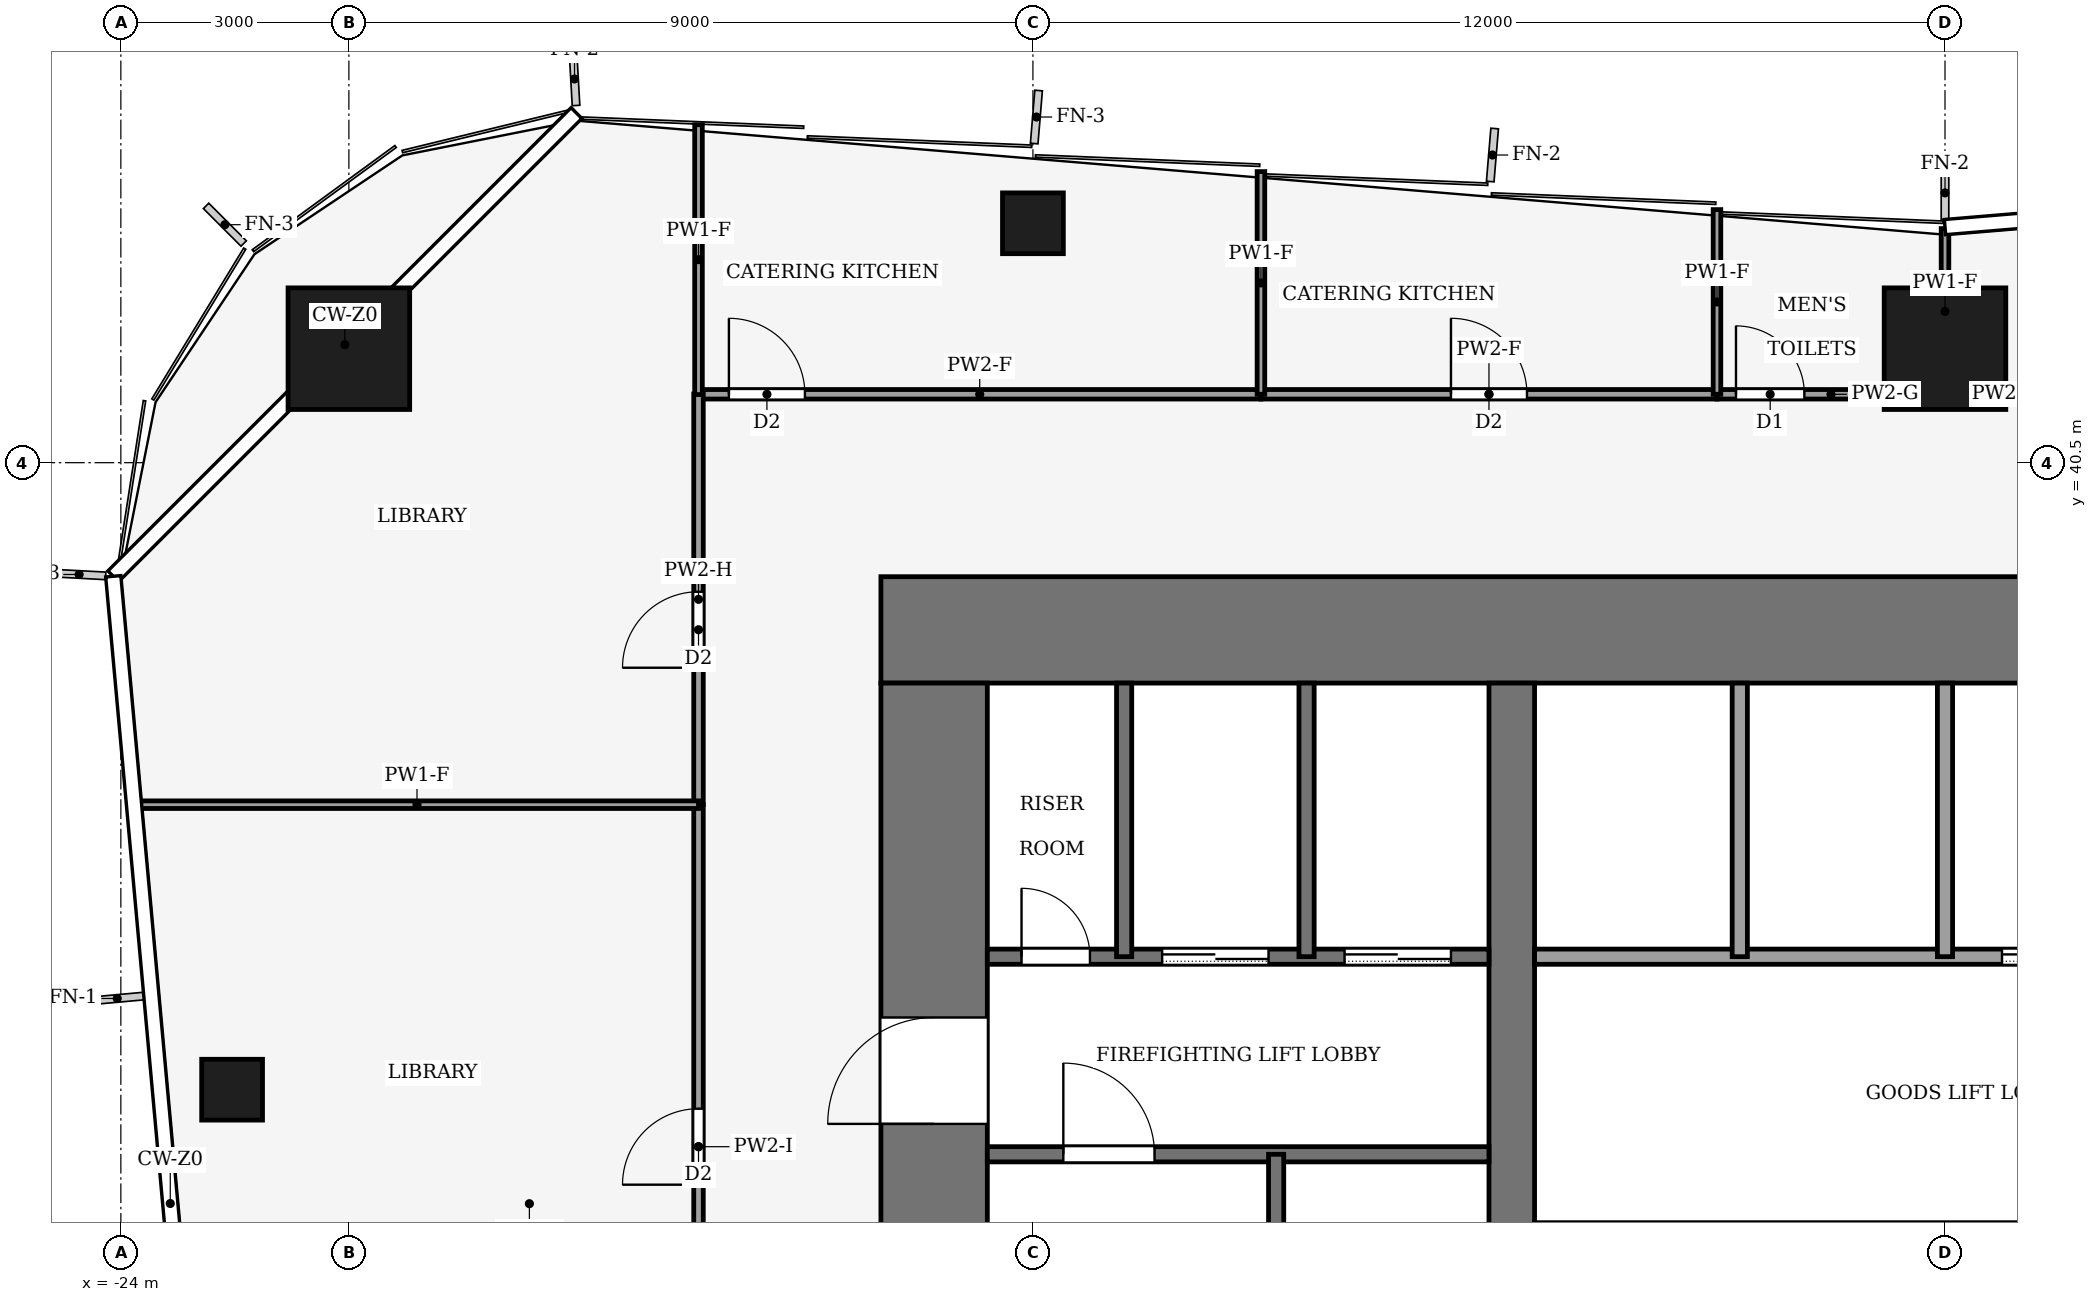
"""IFC4 building model, lengths in metres.
Left out: names, types, materials, properties, quantities, classifications, styles, units other than length and angle.
Written with IfcOpenShell. Run it as: python <this file> out.ifc"""

import sys

from ifc_helpers import new_model, si_unit, direction, frame, frame_2d, origin, origin_2d, place, context, subcontext, project, spatial, rectangle, hollow_rectangle, extrude, element, fill, save


model = new_model("IFC4")
c1 = context("Model", 3, precision=1e-05, world=origin(), true_north=direction((0.0, 1.0)))
c2 = subcontext(c1, "Body", "Model", "MODEL_VIEW")
j1 = project(units=[si_unit("LENGTHUNIT", "METRE"), si_unit("PLANEANGLEUNIT", "RADIAN")], contexts=[c1])
p1 = place(None, origin())
s1 = spatial("IfcSite", under=j1, at=p1, CompositionType="ELEMENT")
p2 = place(p1, origin())
s2 = spatial("IfcBuilding", under=s1, at=p2, CompositionType="ELEMENT")
p3 = place(p2, frame((0.0, 0.0, 14.0)))
s3 = spatial("IfcBuildingStorey", under=s2, at=p3, CompositionType="ELEMENT", Elevation=14.0)
p4 = place(p3, frame((-14.0, 38.3, -0.13), z_axis=(0.0, 0.0, 1.0), x_axis=(1.0, 0.0, 0.0)))
e1 = element("IfcWall", 1, at=p4, inside=s3, PredefinedType="SHEAR", context=c2, shape_type="SweptSolid", body=[
    extrude(rectangle(XDim=28.0, YDim=1.4, at=frame_2d((14.0, 0.0))), origin(), (0.0, 0.0, 1.0), 4.0),
])
p5 = place(p3, frame((-13.3, 18.4, -0.13), z_axis=(0.0, 0.0, 1.0), x_axis=(0.0, 1.0, 0.0)))
e2 = element("IfcWall", 2, at=p5, inside=s3, PredefinedType="SHEAR", context=c2, shape_type="SweptSolid", body=[
    extrude(rectangle(XDim=19.2, YDim=1.4, at=frame_2d((9.6, 0.0))), origin(), (0.0, 0.0, 1.0), 4.0),
])
p6 = place(p5, frame((2.8, 0.0, 0.13)))
e3 = element("IfcOpeningElement", 3, at=p6, cuts=e2, PredefinedType="OPENING", context=c2, shape_type="SweptSolid", body=[
    extrude(rectangle(XDim=2.4, YDim=2.4, at=frame_2d((1.2, 1.2))), frame((0.0, 0.71, 0.0), z_axis=(0.0, -1.0, 0.0), x_axis=(1.0, 0.0, 0.0)), (0.0, 0.0, 1.0), 1.42),
])
p7 = place(p5, frame((13.4, 0.0, 0.13)))
e4 = element("IfcOpeningElement", 4, at=p7, cuts=e2, PredefinedType="OPENING", context=c2, shape_type="SweptSolid", body=[
    extrude(rectangle(XDim=1.4, YDim=2.2, at=frame_2d((0.7, 1.1))), frame((0.0, 0.71, 0.0), z_axis=(0.0, -1.0, 0.0), x_axis=(1.0, 0.0, 0.0)), (0.0, 0.0, 1.0), 1.42),
])
p8 = place(p3, frame((-5.7, 18.4, -0.13), z_axis=(0.0, 0.0, 1.0), x_axis=(0.0, 1.0, 0.0)))
e5 = element("IfcWall", 5, at=p8, inside=s3, PredefinedType="SHEAR", context=c2, shape_type="SweptSolid", body=[
    extrude(rectangle(XDim=19.2, YDim=0.6, at=frame_2d((9.6, 0.0))), origin(), (0.0, 0.0, 1.0), 4.0),
])
p9 = place(p8, frame((8.35, 0.0, 0.13)))
e6 = element("IfcOpeningElement", 6, at=p9, cuts=e5, PredefinedType="OPENING", context=c2, shape_type="SweptSolid", body=[
    extrude(rectangle(XDim=0.9, YDim=2.1, at=frame_2d((0.45, 1.05))), frame((0.0, 0.31, 0.0), z_axis=(0.0, -1.0, 0.0), x_axis=(1.0, 0.0, 0.0)), (0.0, 0.0, 1.0), 0.62),
])
for number, where, z_axis, x_axis in (
    (7, (-21.0, 42.0, 0.0), (0.0, 0.0, 1.0), (1.0, 0.0, 0.0)),
    (8, (0.0, 42.0, 0.0), (0.0, 0.0, 1.0), (1.0, 0.0, 0.0)),
):
    element("IfcColumn", number, at=place(p3, frame(where, z_axis=z_axis, x_axis=x_axis)), inside=s3, PredefinedType="COLUMN", context=c2, shape_type="SweptSolid", body=[
        extrude(hollow_rectangle(XDim=1.6, YDim=1.6, WallThickness=0.09, at=origin_2d()), origin(), (0.0, 0.0, 1.0), 4.0),
    ])
for number, where, z_axis, x_axis in (
    (9, (-12.0, 43.65, 0.0), (0.0, 0.0, 1.0), (1.0, 0.0, 0.0)),
    (10, (-22.536, 32.25, 0.0), (0.0, 0.0, 1.0), (1.0, 0.0, 0.0)),
):
    element("IfcColumn", number, at=place(p3, frame(where, z_axis=z_axis, x_axis=x_axis)), inside=s3, PredefinedType="COLUMN", context=c2, shape_type="SweptSolid", body=[
        extrude(hollow_rectangle(XDim=0.8, YDim=0.8, WallThickness=0.04, at=origin_2d()), origin(), (0.0, 0.0, 1.0), 4.0),
    ])
p10 = place(p3, frame((-12.6, 31.4, 0.0), z_axis=(0.0, 0.0, 1.0), x_axis=(1.0, 0.0, 0.0)))
e11 = element("IfcWall", 11, at=p10, inside=s3, PredefinedType="PARTITIONING", context=c2, shape_type="SweptSolid", body=[
    extrude(rectangle(XDim=6.6, YDim=0.2, at=frame_2d((3.3, 0.0))), origin(), (0.0, 0.0, 1.0), 3.87),
])
p11 = place(p10, frame((1.0, 0.0, 0.0)))
e12 = element("IfcOpeningElement", 12, at=p11, cuts=e11, PredefinedType="OPENING", context=c2, shape_type="SweptSolid", body=[
    extrude(rectangle(XDim=1.2, YDim=2.2, at=frame_2d((0.6, 1.1))), frame((0.0, 0.11, 0.0), z_axis=(0.0, -1.0, 0.0), x_axis=(1.0, 0.0, 0.0)), (0.0, 0.0, 1.0), 0.22),
])
p12 = place(p3, frame((-12.6, 34.0, 0.0), z_axis=(0.0, 0.0, 1.0), x_axis=(1.0, 0.0, 0.0)))
e13 = element("IfcWall", 13, at=p12, inside=s3, PredefinedType="PARTITIONING", context=c2, shape_type="SweptSolid", body=[
    extrude(rectangle(XDim=6.6, YDim=0.2, at=frame_2d((3.3, 0.0))), origin(), (0.0, 0.0, 1.0), 3.87),
])
p13 = place(p12, frame((4.7, 0.0, 0.0)))
e14 = element("IfcOpeningElement", 14, at=p13, cuts=e13, PredefinedType="OPENING", context=c2, shape_type="SweptSolid", body=[
    extrude(rectangle(XDim=1.4, YDim=2.2, at=frame_2d((0.7, 1.1))), frame((0.0, 0.11, 0.0), z_axis=(0.0, -1.0, 0.0), x_axis=(1.0, 0.0, 0.0)), (0.0, 0.0, 1.0), 0.22),
])
p14 = place(p12, frame((2.3, 0.0, 0.0)))
e15 = element("IfcOpeningElement", 15, at=p14, cuts=e13, PredefinedType="OPENING", context=c2, shape_type="SweptSolid", body=[
    extrude(rectangle(XDim=1.4, YDim=2.2, at=frame_2d((0.7, 1.1))), frame((0.0, 0.11, 0.0), z_axis=(0.0, -1.0, 0.0), x_axis=(1.0, 0.0, 0.0)), (0.0, 0.0, 1.0), 0.22),
])
p15 = place(p12, frame((0.45, 0.0, 0.0)))
e16 = element("IfcOpeningElement", 16, at=p15, cuts=e13, PredefinedType="OPENING", context=c2, shape_type="SweptSolid", body=[
    extrude(rectangle(XDim=0.9, YDim=2.1, at=frame_2d((0.45, 1.05))), frame((0.0, 0.11, 0.0), z_axis=(0.0, -1.0, 0.0), x_axis=(1.0, 0.0, 0.0)), (0.0, 0.0, 1.0), 0.22),
])
p16 = place(p3, frame((-5.4, 34.0, 0.0), z_axis=(0.0, 0.0, 1.0), x_axis=(1.0, 0.0, 0.0)))
e17 = element("IfcWall", 17, at=p16, inside=s3, PredefinedType="PARTITIONING", context=c2, shape_type="SweptSolid", body=[
    extrude(rectangle(XDim=10.8, YDim=0.2, at=frame_2d((5.4, 0.0))), origin(), (0.0, 0.0, 1.0), 3.87),
])
p17 = place(p16, frame((6.15, 0.0, 0.0)))
e18 = element("IfcOpeningElement", 18, at=p17, cuts=e17, PredefinedType="OPENING", context=c2, shape_type="SweptSolid", body=[
    extrude(rectangle(XDim=1.2, YDim=2.2, at=frame_2d((0.6, 1.1))), frame((0.0, 0.11, 0.0), z_axis=(0.0, -1.0, 0.0), x_axis=(1.0, 0.0, 0.0)), (0.0, 0.0, 1.0), 0.22),
])
p18 = place(p16, frame((8.95, 0.0, 0.0)))
e19 = element("IfcOpeningElement", 19, at=p18, cuts=e17, PredefinedType="OPENING", context=c2, shape_type="SweptSolid", body=[
    extrude(rectangle(XDim=1.0, YDim=2.1, at=frame_2d((0.5, 1.05))), frame((0.0, 0.11, 0.0), z_axis=(0.0, -1.0, 0.0), x_axis=(1.0, 0.0, 0.0)), (0.0, 0.0, 1.0), 0.22),
])
p19 = place(p3, frame((-10.8, 34.0, 0.0), z_axis=(0.0, 0.0, 1.0), x_axis=(0.0, 1.0, 0.0)))
e20 = element("IfcWall", 20, at=p19, inside=s3, PredefinedType="PARTITIONING", context=c2, shape_type="SweptSolid", body=[
    extrude(rectangle(XDim=3.6, YDim=0.2, at=frame_2d((1.8, 0.0))), origin(), (0.0, 0.0, 1.0), 3.87),
])
p20 = place(p3, frame((-8.8, 24.0, 0.0), z_axis=(0.0, 0.0, 1.0), x_axis=(0.0, 1.0, 0.0)))
e21 = element("IfcWall", 21, at=p20, inside=s3, PredefinedType="PARTITIONING", context=c2, shape_type="SweptSolid", body=[
    extrude(rectangle(XDim=7.4, YDim=0.2, at=frame_2d((3.7, 0.0))), origin(), (0.0, 0.0, 1.0), 3.87),
])
for number, where, z_axis, x_axis in (
    (22, (-8.4, 34.0, 0.0), (0.0, 0.0, 1.0), (0.0, 1.0, 0.0)),
    (23, (-2.7, 34.0, 0.0), (0.0, 0.0, 1.0), (0.0, 1.0, 0.0)),
    (24, (0.0, 34.0, 0.0), (0.0, 0.0, 1.0), (0.0, 1.0, 0.0)),
):
    element("IfcWall", number, at=place(p3, frame(where, z_axis=z_axis, x_axis=x_axis)), inside=s3, PredefinedType="PARTITIONING", context=c2, shape_type="SweptSolid", body=[
        extrude(rectangle(XDim=3.6, YDim=0.2, at=frame_2d((1.8, 0.0))), origin(), (0.0, 0.0, 1.0), 3.87),
    ])
p21 = place(p3, frame((-16.4, 41.4, 0.0), z_axis=(0.0, 0.0, 1.0), x_axis=(1.0, 0.0, 0.0)))
e25 = element("IfcWall", 25, at=p21, inside=s3, PredefinedType="PARTITIONING", context=c2, shape_type="SweptSolid", body=[
    extrude(rectangle(XDim=7.4, YDim=0.125, at=frame_2d((3.7, 0.0))), origin(), (0.0, 0.0, 1.0), 3.54),
])
p22 = place(p21, frame((0.4, 0.0, 0.0)))
e26 = element("IfcOpeningElement", 26, at=p22, cuts=e25, PredefinedType="OPENING", context=c2, shape_type="SweptSolid", body=[
    extrude(rectangle(XDim=1.0, YDim=2.1, at=frame_2d((0.5, 1.05))), frame((0.0, 0.073, 0.0), z_axis=(0.0, -1.0, 0.0), x_axis=(1.0, 0.0, 0.0)), (0.0, 0.0, 1.0), 0.145),
])
p23 = place(p3, frame((-9.0, 41.4, 0.0), z_axis=(0.0, 0.0, 1.0), x_axis=(1.0, 0.0, 0.0)))
e27 = element("IfcWall", 27, at=p23, inside=s3, PredefinedType="PARTITIONING", context=c2, shape_type="SweptSolid", body=[
    extrude(rectangle(XDim=6.0, YDim=0.125, at=frame_2d((3.0, 0.0))), origin(), (0.0, 0.0, 1.0), 3.54),
])
p24 = place(p23, frame((2.5, 0.0, 0.0)))
e28 = element("IfcOpeningElement", 28, at=p24, cuts=e27, PredefinedType="OPENING", context=c2, shape_type="SweptSolid", body=[
    extrude(rectangle(XDim=1.0, YDim=2.1, at=frame_2d((0.5, 1.05))), frame((0.0, 0.073, 0.0), z_axis=(0.0, -1.0, 0.0), x_axis=(1.0, 0.0, 0.0)), (0.0, 0.0, 1.0), 0.145),
])
p25 = place(p3, frame((-3.0, 41.4, 0.0), z_axis=(0.0, 0.0, 1.0), x_axis=(1.0, 0.0, 0.0)))
e29 = element("IfcWall", 29, at=p25, inside=s3, PredefinedType="PARTITIONING", context=c2, shape_type="SweptSolid", body=[
    extrude(rectangle(XDim=3.0, YDim=0.125, at=frame_2d((1.5, 0.0))), origin(), (0.0, 0.0, 1.0), 3.87),
])
p26 = place(p25, frame((0.25, 0.0, 0.0)))
e30 = element("IfcOpeningElement", 30, at=p26, cuts=e29, PredefinedType="OPENING", context=c2, shape_type="SweptSolid", body=[
    extrude(rectangle(XDim=0.9, YDim=2.1, at=frame_2d((0.45, 1.05))), frame((0.0, 0.073, 0.0), z_axis=(0.0, -1.0, 0.0), x_axis=(1.0, 0.0, 0.0)), (0.0, 0.0, 1.0), 0.145),
])
p27 = place(p3, frame((0.0, 41.4, 0.0), z_axis=(0.0, 0.0, 1.0), x_axis=(1.0, 0.0, 0.0)))
e31 = element("IfcWall", 31, at=p27, inside=s3, PredefinedType="PARTITIONING", context=c2, shape_type="SweptSolid", body=[
    extrude(rectangle(XDim=3.0, YDim=0.125, at=frame_2d((1.5, 0.0))), origin(), (0.0, 0.0, 1.0), 3.87),
])
p28 = place(p27, frame((1.85, 0.0, 0.0)))
e32 = element("IfcOpeningElement", 32, at=p28, cuts=e31, PredefinedType="OPENING", context=c2, shape_type="SweptSolid", body=[
    extrude(rectangle(XDim=0.9, YDim=2.1, at=frame_2d((0.45, 1.05))), frame((0.0, 0.073, 0.0), z_axis=(0.0, -1.0, 0.0), x_axis=(1.0, 0.0, 0.0)), (0.0, 0.0, 1.0), 0.145),
])
p29 = place(p3, frame((-16.4, 27.0, 0.0), z_axis=(0.0, 0.0, 1.0), x_axis=(0.0, 1.0, 0.0)))
e33 = element("IfcWall", 33, at=p29, inside=s3, PredefinedType="PARTITIONING", context=c2, shape_type="SweptSolid", body=[
    extrude(rectangle(XDim=9.0, YDim=0.125, at=frame_2d((4.5, 0.0))), origin(), (0.0, 0.0, 1.0), 3.48),
])
p30 = place(p29, frame((4.0, 0.0, 0.0)))
e34 = element("IfcOpeningElement", 34, at=p30, cuts=e33, PredefinedType="OPENING", context=c2, shape_type="SweptSolid", body=[
    extrude(rectangle(XDim=1.0, YDim=2.1, at=frame_2d((0.5, 1.05))), frame((0.0, 0.073, 0.0), z_axis=(0.0, -1.0, 0.0), x_axis=(1.0, 0.0, 0.0)), (0.0, 0.0, 1.0), 0.145),
])
p31 = place(p3, frame((-16.4, 36.0, 0.0), z_axis=(0.0, 0.0, 1.0), x_axis=(0.0, 1.0, 0.0)))
e35 = element("IfcWall", 35, at=p31, inside=s3, PredefinedType="PARTITIONING", context=c2, shape_type="SweptSolid", body=[
    extrude(rectangle(XDim=5.404, YDim=0.125, at=frame_2d((2.702, 0.0))), origin(), (0.0, 0.0, 1.0), 3.14),
])
p32 = place(p31, frame((1.802, 0.0, 0.0)))
e36 = element("IfcOpeningElement", 36, at=p32, cuts=e35, PredefinedType="OPENING", context=c2, shape_type="SweptSolid", body=[
    extrude(rectangle(XDim=1.0, YDim=2.1, at=frame_2d((0.5, 1.05))), frame((0.0, 0.073, 0.0), z_axis=(0.0, -1.0, 0.0), x_axis=(1.0, 0.0, 0.0)), (0.0, 0.0, 1.0), 0.145),
])
p33 = place(p3, frame((-9.0, 41.4, 0.0), z_axis=(0.0, 0.0, 1.0), x_axis=(0.0, 1.0, 0.0)))
e37 = element("IfcWall", 37, at=p33, inside=s3, PredefinedType="PARTITIONING", context=c2, shape_type="SweptSolid", body=[
    extrude(rectangle(XDim=2.93, YDim=0.1, at=frame_2d((1.465, 0.0))), origin(), (0.0, 0.0, 1.0), 3.04),
])
p34 = place(p3, frame((-16.4, 44.947, 0.0), z_axis=(0.0, 0.0, 1.0), x_axis=(0.0, -1.0, 0.0)))
e38 = element("IfcWall", 38, at=p34, inside=s3, PredefinedType="PARTITIONING", context=c2, shape_type="SweptSolid", body=[
    extrude(rectangle(XDim=3.551, YDim=0.1, at=frame_2d((1.775, 0.0))), origin(), (0.0, 0.0, 1.0), 3.04),
])
p35 = place(p3, frame((-3.0, 41.4, 0.0), z_axis=(0.0, 0.0, 1.0), x_axis=(0.0, 1.0, 0.0)))
e39 = element("IfcWall", 39, at=p35, inside=s3, PredefinedType="PARTITIONING", context=c2, shape_type="SweptSolid", body=[
    extrude(rectangle(XDim=2.43, YDim=0.1, at=frame_2d((1.215, 0.0))), origin(), (0.0, 0.0, 1.0), 3.04),
])
p36 = place(p3, frame((0.0, 41.4, 0.0), z_axis=(0.0, 0.0, 1.0), x_axis=(0.0, 1.0, 0.0)))
e40 = element("IfcWall", 40, at=p36, inside=s3, PredefinedType="PARTITIONING", context=c2, shape_type="SweptSolid", body=[
    extrude(rectangle(XDim=2.18, YDim=0.1, at=frame_2d((1.09, 0.0))), origin(), (0.0, 0.0, 1.0), 3.04),
])
p37 = place(p3, frame((-16.4, 36.0, 0.0), z_axis=(0.0, 0.0, 1.0), x_axis=(-1.0, 0.0, 0.0)))
e41 = element("IfcWall", 41, at=p37, inside=s3, PredefinedType="PARTITIONING", context=c2, shape_type="SweptSolid", body=[
    extrude(rectangle(XDim=7.407, YDim=0.1, at=frame_2d((3.704, 0.0))), origin(), (0.0, 0.0, 1.0), 3.04),
])
p38 = place(p17, origin())
e42 = element("IfcDoor", 42, at=p38, inside=s3, OperationType="SLIDING_TO_LEFT", PredefinedType="DOOR", context=c2, shape_type="SweptSolid", body=[
    extrude(rectangle(XDim=1.2, YDim=2.2, at=frame_2d((0.6, 1.1))), frame((0.0, 0.025, 0.0), z_axis=(0.0, -1.0, 0.0), x_axis=(1.0, 0.0, 0.0)), (0.0, 0.0, 1.0), 0.05),
])
fill(e18, e42)
p39 = place(p13, origin())
e43 = element("IfcDoor", 43, at=p39, inside=s3, OperationType="SLIDING_TO_LEFT", PredefinedType="DOOR", context=c2, shape_type="SweptSolid", body=[
    extrude(rectangle(XDim=1.4, YDim=2.2, at=frame_2d((0.7, 1.1))), frame((0.0, 0.025, 0.0), z_axis=(0.0, -1.0, 0.0), x_axis=(1.0, 0.0, 0.0)), (0.0, 0.0, 1.0), 0.05),
])
fill(e14, e43)
p40 = place(p14, origin())
e44 = element("IfcDoor", 44, at=p40, inside=s3, OperationType="SLIDING_TO_LEFT", PredefinedType="DOOR", context=c2, shape_type="SweptSolid", body=[
    extrude(rectangle(XDim=1.4, YDim=2.2, at=frame_2d((0.7, 1.1))), frame((0.0, 0.025, 0.0), z_axis=(0.0, -1.0, 0.0), x_axis=(1.0, 0.0, 0.0)), (0.0, 0.0, 1.0), 0.05),
])
fill(e15, e44)
p41 = place(p15, origin())
e45 = element("IfcDoor", 45, at=p41, inside=s3, OperationType="SINGLE_SWING_RIGHT", PredefinedType="DOOR", context=c2, shape_type="SweptSolid", body=[
    extrude(rectangle(XDim=0.9, YDim=2.1, at=frame_2d((0.45, 1.05))), frame((0.0, 0.025, 0.0), z_axis=(0.0, -1.0, 0.0), x_axis=(1.0, 0.0, 0.0)), (0.0, 0.0, 1.0), 0.05),
])
fill(e16, e45)
p42 = place(p11, origin())
e46 = element("IfcDoor", 46, at=p42, inside=s3, OperationType="SINGLE_SWING_RIGHT", PredefinedType="DOOR", context=c2, shape_type="SweptSolid", body=[
    extrude(rectangle(XDim=1.2, YDim=2.2, at=frame_2d((0.6, 1.1))), frame((0.0, 0.025, 0.0), z_axis=(0.0, -1.0, 0.0), x_axis=(1.0, 0.0, 0.0)), (0.0, 0.0, 1.0), 0.05),
])
fill(e12, e46)
p43 = place(p7, origin())
e47 = element("IfcDoor", 47, at=p43, inside=s3, OperationType="SINGLE_SWING_RIGHT", PredefinedType="DOOR", context=c2, shape_type="SweptSolid", body=[
    extrude(rectangle(XDim=1.4, YDim=2.2, at=frame_2d((0.7, 1.1))), frame((0.0, 0.025, 0.0), z_axis=(0.0, -1.0, 0.0), x_axis=(1.0, 0.0, 0.0)), (0.0, 0.0, 1.0), 0.05),
])
fill(e4, e47)
p44 = place(p22, origin())
e48 = element("IfcDoor", 48, at=p44, inside=s3, OperationType="SINGLE_SWING_LEFT", PredefinedType="DOOR", context=c2, shape_type="SweptSolid", body=[
    extrude(rectangle(XDim=1.0, YDim=2.1, at=frame_2d((0.5, 1.05))), frame((0.0, 0.025, 0.0), z_axis=(0.0, -1.0, 0.0), x_axis=(1.0, 0.0, 0.0)), (0.0, 0.0, 1.0), 0.05),
])
fill(e26, e48)
p45 = place(p24, origin())
e49 = element("IfcDoor", 49, at=p45, inside=s3, OperationType="SINGLE_SWING_LEFT", PredefinedType="DOOR", context=c2, shape_type="SweptSolid", body=[
    extrude(rectangle(XDim=1.0, YDim=2.1, at=frame_2d((0.5, 1.05))), frame((0.0, 0.025, 0.0), z_axis=(0.0, -1.0, 0.0), x_axis=(1.0, 0.0, 0.0)), (0.0, 0.0, 1.0), 0.05),
])
fill(e28, e49)
p46 = place(p26, origin())
e50 = element("IfcDoor", 50, at=p46, inside=s3, OperationType="SINGLE_SWING_LEFT", PredefinedType="DOOR", context=c2, shape_type="SweptSolid", body=[
    extrude(rectangle(XDim=0.9, YDim=2.1, at=frame_2d((0.45, 1.05))), frame((0.0, 0.025, 0.0), z_axis=(0.0, -1.0, 0.0), x_axis=(1.0, 0.0, 0.0)), (0.0, 0.0, 1.0), 0.05),
])
fill(e30, e50)
p47 = place(p30, origin())
e51 = element("IfcDoor", 51, at=p47, inside=s3, OperationType="SINGLE_SWING_RIGHT", PredefinedType="DOOR", context=c2, shape_type="SweptSolid", body=[
    extrude(rectangle(XDim=1.0, YDim=2.1, at=frame_2d((0.5, 1.05))), frame((0.0, 0.025, 0.0), z_axis=(0.0, -1.0, 0.0), x_axis=(1.0, 0.0, 0.0)), (0.0, 0.0, 1.0), 0.05),
])
fill(e34, e51)
p48 = place(p32, origin())
e52 = element("IfcDoor", 52, at=p48, inside=s3, OperationType="SINGLE_SWING_LEFT", PredefinedType="DOOR", context=c2, shape_type="SweptSolid", body=[
    extrude(rectangle(XDim=1.0, YDim=2.1, at=frame_2d((0.5, 1.05))), frame((0.0, 0.025, 0.0), z_axis=(0.0, -1.0, 0.0), x_axis=(1.0, 0.0, 0.0)), (0.0, 0.0, 1.0), 0.05),
])
fill(e36, e52)
save(model, sys.argv[1])
